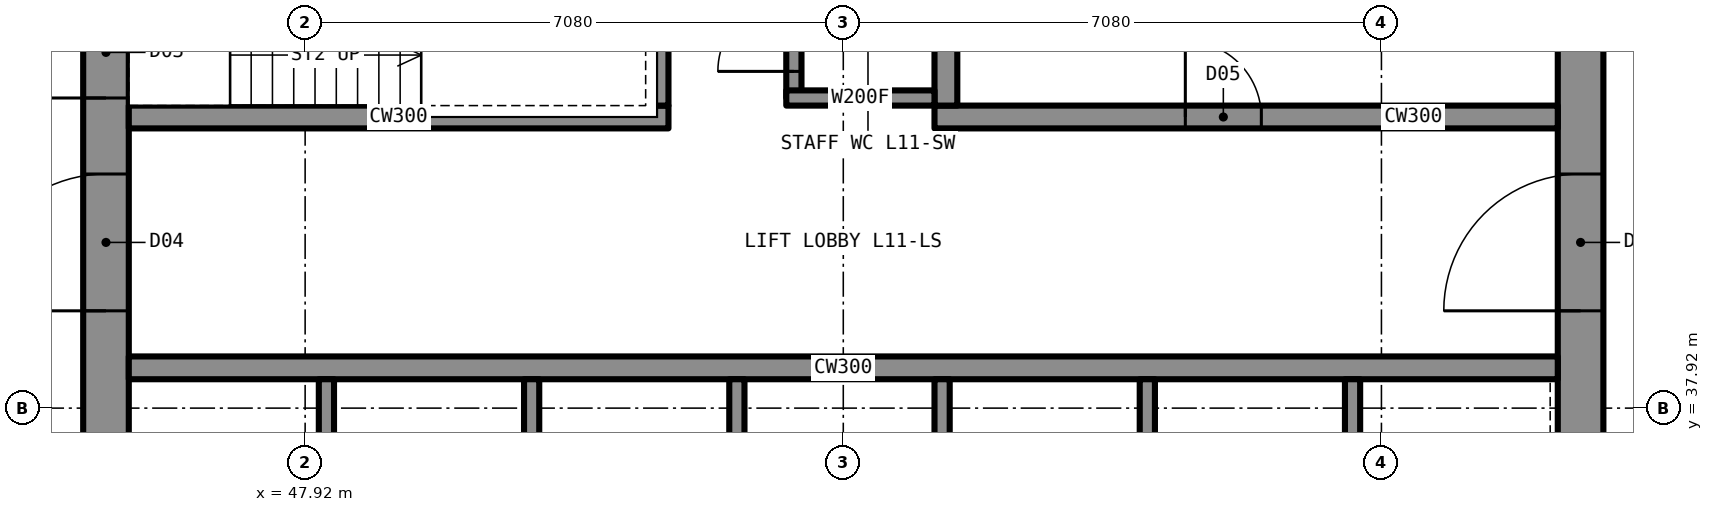
"""IFC4 building model, lengths in metres.
Left out: names, types, materials, properties, quantities, classifications, styles, units other than length and angle.
Written with IfcOpenShell. Run it as: python <this file> out.ifc"""

import sys

from ifc_helpers import new_model, si_unit, direction, frame, frame_2d, origin, place, context, subcontext, project, spatial, rectangle, extrude, element, fill, save


model = new_model("IFC4")
c1 = context("Model", 3, precision=1e-05, world=origin(), true_north=direction((0.0, 1.0)))
c2 = subcontext(c1, "Body", "Model", "MODEL_VIEW")
j1 = project(units=[si_unit("LENGTHUNIT", "METRE"), si_unit("PLANEANGLEUNIT", "RADIAN")], contexts=[c1])
p1 = place(None, origin())
s1 = spatial("IfcSite", under=j1, at=p1, CompositionType="ELEMENT")
p2 = place(p1, origin())
s2 = spatial("IfcBuilding", under=s1, at=p2, CompositionType="ELEMENT")
p3 = place(p2, frame((0.0, 0.0, 39.0)))
s3 = spatial("IfcBuildingStorey", under=s2, at=p3, CompositionType="ELEMENT", Elevation=39.0)
p4 = place(p3, frame((64.7, 35.6, 0.0), z_axis=(0.0, 0.0, 1.0), x_axis=(0.0, 1.0, 0.0)))
e1 = element("IfcWall", 1, at=p4, inside=s3, PredefinedType="SHEAR", context=c2, shape_type="SweptSolid", body=[
    extrude(rectangle(XDim=18.8, YDim=0.6, at=frame_2d((9.4, 0.0))), origin(), (0.0, 0.0, 1.0), 3.5),
])
p5 = place(p4, frame((13.4, 0.0, 0.0)))
e2 = element("IfcOpeningElement", 2, at=p5, cuts=e1, PredefinedType="OPENING", context=c2, shape_type="SweptSolid", body=[
    extrude(rectangle(XDim=1.8, YDim=2.2, at=frame_2d((0.9, 1.1))), frame((0.0, 0.31, 0.0), z_axis=(0.0, -1.0, 0.0), x_axis=(1.0, 0.0, 0.0)), (0.0, 0.0, 1.0), 0.62),
])
p6 = place(p4, frame((3.6, 0.0, 0.0)))
e3 = element("IfcOpeningElement", 3, at=p6, cuts=e1, PredefinedType="OPENING", context=c2, shape_type="SweptSolid", body=[
    extrude(rectangle(XDim=1.8, YDim=2.2, at=frame_2d((0.9, 1.1))), frame((0.0, 0.31, 0.0), z_axis=(0.0, -1.0, 0.0), x_axis=(1.0, 0.0, 0.0)), (0.0, 0.0, 1.0), 0.62),
])
p7 = place(p3, frame((45.3, 35.6, 0.0), z_axis=(0.0, 0.0, 1.0), x_axis=(0.0, 1.0, 0.0)))
e4 = element("IfcWall", 4, at=p7, inside=s3, PredefinedType="SHEAR", context=c2, shape_type="SweptSolid", body=[
    extrude(rectangle(XDim=18.8, YDim=0.6, at=frame_2d((9.4, 0.0))), origin(), (0.0, 0.0, 1.0), 3.5),
])
p8 = place(p7, frame((13.4, 0.0, 0.0)))
e5 = element("IfcOpeningElement", 5, at=p8, cuts=e4, PredefinedType="OPENING", context=c2, shape_type="SweptSolid", body=[
    extrude(rectangle(XDim=1.8, YDim=2.2, at=frame_2d((0.9, 1.1))), frame((0.0, 0.31, 0.0), z_axis=(0.0, -1.0, 0.0), x_axis=(1.0, 0.0, 0.0)), (0.0, 0.0, 1.0), 0.62),
])
p9 = place(p7, frame((3.6, 0.0, 0.0)))
e6 = element("IfcOpeningElement", 6, at=p9, cuts=e4, PredefinedType="OPENING", context=c2, shape_type="SweptSolid", body=[
    extrude(rectangle(XDim=1.8, YDim=2.2, at=frame_2d((0.9, 1.1))), frame((0.0, 0.31, 0.0), z_axis=(0.0, -1.0, 0.0), x_axis=(1.0, 0.0, 0.0)), (0.0, 0.0, 1.0), 0.62),
])
p10 = place(p7, frame((6.4, 0.0, 0.0)))
e7 = element("IfcOpeningElement", 7, at=p10, cuts=e4, PredefinedType="OPENING", context=c2, shape_type="SweptSolid", body=[
    extrude(rectangle(XDim=1.2, YDim=2.2, at=frame_2d((0.6, 1.1))), frame((0.0, 0.31, 0.0), z_axis=(0.0, -1.0, 0.0), x_axis=(1.0, 0.0, 0.0)), (0.0, 0.0, 1.0), 0.62),
])
p11 = place(p3, frame((45.6, 38.45, 0.0), z_axis=(0.0, 0.0, 1.0), x_axis=(1.0, 0.0, 0.0)))
e8 = element("IfcWall", 8, at=p11, inside=s3, PredefinedType="SHEAR", context=c2, shape_type="SweptSolid", body=[
    extrude(rectangle(XDim=18.8, YDim=0.3, at=frame_2d((9.4, 0.0))), origin(), (0.0, 0.0, 1.0), 3.5),
])
p12 = place(p3, frame((45.6, 41.75, 0.0), z_axis=(0.0, 0.0, 1.0), x_axis=(1.0, 0.0, 0.0)))
e9 = element("IfcWall", 9, at=p12, inside=s3, PredefinedType="SHEAR", context=c2, shape_type="SweptSolid", body=[
    extrude(rectangle(XDim=7.1, YDim=0.3, at=frame_2d((3.55, 0.0))), origin(), (0.0, 0.0, 1.0), 3.5),
])
p13 = place(p3, frame((56.2, 41.75, 0.0), z_axis=(0.0, 0.0, 1.0), x_axis=(1.0, 0.0, 0.0)))
e10 = element("IfcWall", 10, at=p13, inside=s3, PredefinedType="SHEAR", context=c2, shape_type="SweptSolid", body=[
    extrude(rectangle(XDim=8.2, YDim=0.3, at=frame_2d((4.1, 0.0))), origin(), (0.0, 0.0, 1.0), 3.5),
])
p14 = place(p13, frame((3.3, 0.0, 0.0)))
e11 = element("IfcOpeningElement", 11, at=p14, cuts=e10, PredefinedType="OPENING", context=c2, shape_type="SweptSolid", body=[
    extrude(rectangle(XDim=1.0, YDim=2.1, at=frame_2d((0.5, 1.05))), frame((0.0, 0.16, 0.0), z_axis=(0.0, -1.0, 0.0), x_axis=(1.0, 0.0, 0.0)), (0.0, 0.0, 1.0), 0.32),
])
p15 = place(p3, frame((52.55, 41.9, 0.0), z_axis=(0.0, 0.0, 1.0), x_axis=(0.0, 1.0, 0.0)))
e12 = element("IfcWall", 12, at=p15, inside=s3, PredefinedType="SHEAR", context=c2, shape_type="SweptSolid", body=[
    extrude(rectangle(XDim=6.2, YDim=0.3, at=frame_2d((3.1, 0.0))), origin(), (0.0, 0.0, 1.0), 3.5),
])
p16 = place(p15, frame((4.125, 0.0, 0.0)))
e13 = element("IfcOpeningElement", 13, at=p16, cuts=e12, PredefinedType="OPENING", context=c2, shape_type="SweptSolid", body=[
    extrude(rectangle(XDim=1.2, YDim=2.2, at=frame_2d((0.6, 1.1))), frame((0.0, 0.16, 0.0), z_axis=(0.0, -1.0, 0.0), x_axis=(1.0, 0.0, 0.0)), (0.0, 0.0, 1.0), 0.32),
])
p17 = place(p3, frame((56.35, 41.9, 0.0), z_axis=(0.0, 0.0, 1.0), x_axis=(0.0, 1.0, 0.0)))
e14 = element("IfcWall", 14, at=p17, inside=s3, PredefinedType="SHEAR", context=c2, shape_type="SweptSolid", body=[
    extrude(rectangle(XDim=9.5, YDim=0.3, at=frame_2d((4.75, 0.0))), origin(), (0.0, 0.0, 1.0), 3.5),
])
p18 = place(p17, frame((7.1, 0.0, 0.0)))
e15 = element("IfcOpeningElement", 15, at=p18, cuts=e14, PredefinedType="OPENING", context=c2, shape_type="SweptSolid", body=[
    extrude(rectangle(XDim=1.8, YDim=2.2, at=frame_2d((0.9, 1.1))), frame((0.0, 0.16, 0.0), z_axis=(0.0, -1.0, 0.0), x_axis=(1.0, 0.0, 0.0)), (0.0, 0.0, 1.0), 0.32),
])
p19 = place(p3, frame((54.35, 42.0, 0.0), z_axis=(0.0, 0.0, 1.0), x_axis=(0.0, 1.0, 0.0)))
e16 = element("IfcWall", 16, at=p19, inside=s3, PredefinedType="PARTITIONING", context=c2, shape_type="SweptSolid", body=[
    extrude(rectangle(XDim=1.5, YDim=0.2, at=frame_2d((0.75, 0.0))), origin(), (0.0, 0.0, 1.0), 3.33),
])
p20 = place(p19, frame((0.25, 0.0, 0.0)))
e17 = element("IfcOpeningElement", 17, at=p20, cuts=e16, PredefinedType="OPENING", context=c2, shape_type="SweptSolid", body=[
    extrude(rectangle(XDim=1.0, YDim=2.1, at=frame_2d((0.5, 1.05))), frame((0.0, 0.11, 0.0), z_axis=(0.0, -1.0, 0.0), x_axis=(1.0, 0.0, 0.0)), (0.0, 0.0, 1.0), 0.22),
])
p21 = place(p3, frame((54.25, 42.0, 0.0), z_axis=(0.0, 0.0, 1.0), x_axis=(1.0, 0.0, 0.0)))
e18 = element("IfcWall", 18, at=p21, inside=s3, PredefinedType="PARTITIONING", context=c2, shape_type="SweptSolid", body=[
    extrude(rectangle(XDim=1.95, YDim=0.2, at=frame_2d((0.975, 0.0))), origin(), (0.0, 0.0, 1.0), 3.33),
])
for number, where, z_axis, x_axis in (
    (19, (48.2, 35.6, 0.0), (0.0, 0.0, 1.0), (0.0, 1.0, 0.0)),
    (20, (50.9, 35.6, 0.0), (0.0, 0.0, 1.0), (0.0, 1.0, 0.0)),
    (21, (53.6, 35.6, 0.0), (0.0, 0.0, 1.0), (0.0, 1.0, 0.0)),
    (22, (56.3, 35.6, 0.0), (0.0, 0.0, 1.0), (0.0, 1.0, 0.0)),
    (23, (59.0, 35.6, 0.0), (0.0, 0.0, 1.0), (0.0, 1.0, 0.0)),
    (24, (61.7, 35.6, 0.0), (0.0, 0.0, 1.0), (0.0, 1.0, 0.0)),
):
    element("IfcWall", number, at=place(p3, frame(where, z_axis=z_axis, x_axis=x_axis)), inside=s3, PredefinedType="PARTITIONING", context=c2, shape_type="SweptSolid", body=[
        extrude(rectangle(XDim=2.7, YDim=0.2, at=frame_2d((1.35, 0.0))), origin(), (0.0, 0.0, 1.0), 3.33),
    ])
p22 = place(p20, origin())
e25 = element("IfcDoor", 25, at=p22, inside=s3, OperationType="SINGLE_SWING_LEFT", PredefinedType="DOOR", context=c2, shape_type="SweptSolid", body=[
    extrude(rectangle(XDim=1.0, YDim=2.1, at=frame_2d((0.5, 1.05))), frame((0.0, 0.025, 0.0), z_axis=(0.0, -1.0, 0.0), x_axis=(1.0, 0.0, 0.0)), (0.0, 0.0, 1.0), 0.05),
])
fill(e17, e25)
p23 = place(p9, origin())
e26 = element("IfcDoor", 26, at=p23, inside=s3, OperationType="DOUBLE_DOOR_SINGLE_SWING", PredefinedType="DOOR", context=c2, shape_type="SweptSolid", body=[
    extrude(rectangle(XDim=1.8, YDim=2.2, at=frame_2d((0.9, 1.1))), frame((0.0, 0.025, 0.0), z_axis=(0.0, -1.0, 0.0), x_axis=(1.0, 0.0, 0.0)), (0.0, 0.0, 1.0), 0.05),
])
fill(e6, e26)
p24 = place(p6, origin())
e27 = element("IfcDoor", 27, at=p24, inside=s3, OperationType="DOUBLE_DOOR_SINGLE_SWING", PredefinedType="DOOR", context=c2, shape_type="SweptSolid", body=[
    extrude(rectangle(XDim=1.8, YDim=2.2, at=frame_2d((0.9, 1.1))), frame((0.0, 0.025, 0.0), z_axis=(0.0, -1.0, 0.0), x_axis=(1.0, 0.0, 0.0)), (0.0, 0.0, 1.0), 0.05),
])
fill(e3, e27)
p25 = place(p10, origin())
e28 = element("IfcDoor", 28, at=p25, inside=s3, OperationType="SINGLE_SWING_LEFT", PredefinedType="DOOR", context=c2, shape_type="SweptSolid", body=[
    extrude(rectangle(XDim=1.2, YDim=2.2, at=frame_2d((0.6, 1.1))), frame((0.0, 0.025, 0.0), z_axis=(0.0, -1.0, 0.0), x_axis=(1.0, 0.0, 0.0)), (0.0, 0.0, 1.0), 0.05),
])
fill(e7, e28)
p26 = place(p14, origin())
e29 = element("IfcDoor", 29, at=p26, inside=s3, OperationType="SINGLE_SWING_LEFT", PredefinedType="DOOR", context=c2, shape_type="SweptSolid", body=[
    extrude(rectangle(XDim=1.0, YDim=2.1, at=frame_2d((0.5, 1.05))), frame((0.0, 0.025, 0.0), z_axis=(0.0, -1.0, 0.0), x_axis=(1.0, 0.0, 0.0)), (0.0, 0.0, 1.0), 0.05),
])
fill(e11, e29)
save(model, sys.argv[1])
